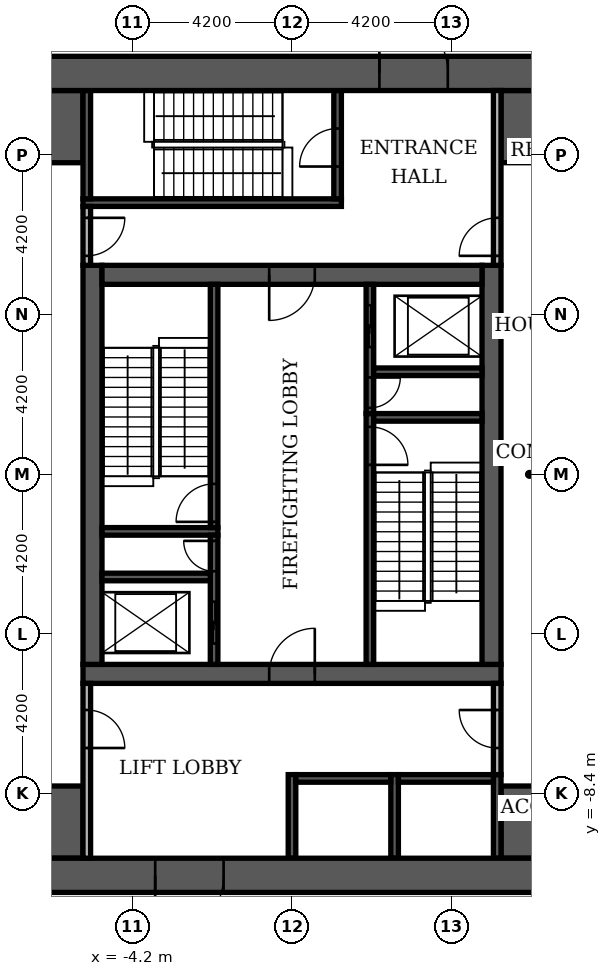
"""IFC4 building model, lengths in metres.
Left out: names, types, materials, properties, quantities, classifications, styles, units other than length and angle.
Written with IfcOpenShell. Run it as: python <this file> out.ifc"""

import sys

from ifc_helpers import new_model, si_unit, direction, frame, frame_2d, origin, place, context, subcontext, project, spatial, rectangle, extrude, element, fill, save


model = new_model("IFC4")
c1 = context("Model", 3, precision=1e-05, world=origin(), true_north=direction((0.0, 1.0)))
c2 = subcontext(c1, "Body", "Model", "MODEL_VIEW")
j1 = project(units=[si_unit("LENGTHUNIT", "METRE"), si_unit("PLANEANGLEUNIT", "RADIAN")], contexts=[c1])
p1 = place(None, origin())
s1 = spatial("IfcSite", under=j1, at=p1, CompositionType="ELEMENT")
p2 = place(p1, origin())
s2 = spatial("IfcBuilding", under=s1, at=p2, CompositionType="ELEMENT")
p3 = place(p2, frame((0.0, 0.0, 12.0)))
s3 = spatial("IfcBuildingStorey", under=s2, at=p3, CompositionType="ELEMENT", Elevation=12.0)
p4 = place(p3, frame((-5.5, -5.25, 0.0), z_axis=(0.0, 0.0, 1.0), x_axis=(1.0, 0.0, 0.0)))
e1 = element("IfcWall", 1, at=p4, inside=s3, PredefinedType="SHEAR", context=c2, shape_type="SweptSolid", body=[
    extrude(rectangle(XDim=11.0, YDim=0.5, at=frame_2d((5.5, 0.0))), origin(), (0.0, 0.0, 1.0), 4.38),
])
p5 = place(p4, frame((4.9, 0.0, 0.0)))
e2 = element("IfcOpeningElement", 2, at=p5, cuts=e1, PredefinedType="OPENING", context=c2, shape_type="SweptSolid", body=[
    extrude(rectangle(XDim=1.2, YDim=2.1, at=frame_2d((0.6, 1.05))), frame((0.0, 0.26, 0.0), z_axis=(0.0, -1.0, 0.0), x_axis=(1.0, 0.0, 0.0)), (0.0, 0.0, 1.0), 0.52),
])
for number, where, z_axis, x_axis in (
    (3, (-5.25, -5.0, 0.0), (0.0, 0.0, 1.0), (0.0, 1.0, 0.0)),
    (4, (5.25, -5.0, 0.0), (0.0, 0.0, 1.0), (0.0, 1.0, 0.0)),
):
    element("IfcWall", number, at=place(p3, frame(where, z_axis=z_axis, x_axis=x_axis)), inside=s3, PredefinedType="SHEAR", context=c2, shape_type="SweptSolid", body=[
        extrude(rectangle(XDim=10.5, YDim=0.5, at=frame_2d((5.25, 0.0))), origin(), (0.0, 0.0, 1.0), 4.38),
    ])
p6 = place(p3, frame((-5.0, 5.25, 0.0), z_axis=(0.0, 0.0, 1.0), x_axis=(1.0, 0.0, 0.0)))
e5 = element("IfcWall", 5, at=p6, inside=s3, PredefinedType="SHEAR", context=c2, shape_type="SweptSolid", body=[
    extrude(rectangle(XDim=10.0, YDim=0.5, at=frame_2d((5.0, 0.0))), origin(), (0.0, 0.0, 1.0), 4.38),
])
p7 = place(p6, frame((4.4, 0.0, 0.0)))
e6 = element("IfcOpeningElement", 6, at=p7, cuts=e5, PredefinedType="OPENING", context=c2, shape_type="SweptSolid", body=[
    extrude(rectangle(XDim=1.2, YDim=2.1, at=frame_2d((0.6, 1.05))), frame((0.0, 0.26, 0.0), z_axis=(0.0, -1.0, 0.0), x_axis=(1.0, 0.0, 0.0)), (0.0, 0.0, 1.0), 0.52),
])
for number, where, z_axis, x_axis in (
    (7, (-10.1, -9.15, 0.0), (0.0, 0.0, 1.0), (1.0, 0.0, 0.0)),
    (8, (5.5, -9.15, 0.0), (0.0, 0.0, 1.0), (1.0, 0.0, 0.0)),
    (9, (-10.1, 9.15, 0.0), (0.0, 0.0, 1.0), (1.0, 0.0, 0.0)),
    (10, (5.5, 9.15, 0.0), (0.0, 0.0, 1.0), (1.0, 0.0, 0.0)),
):
    element("IfcWall", number, at=place(p3, frame(where, z_axis=z_axis, x_axis=x_axis)), inside=s3, PredefinedType="SHEAR", context=c2, shape_type="SweptSolid", body=[
        extrude(rectangle(XDim=4.6, YDim=1.9, at=frame_2d((2.3, 0.0))), origin(), (0.0, 0.0, 1.0), 4.38),
    ])
p8 = place(p3, frame((2.05, -5.0, 0.0), z_axis=(0.0, 0.0, 1.0), x_axis=(0.0, 1.0, 0.0)))
e11 = element("IfcWall", 11, at=p8, inside=s3, PredefinedType="SHEAR", context=c2, shape_type="SweptSolid", body=[
    extrude(rectangle(XDim=6.6, YDim=0.2, at=frame_2d((3.3, 0.0))), origin(), (0.0, 0.0, 1.0), 4.38),
])
p9 = place(p8, frame((5.25, 0.0, 0.0)))
e12 = element("IfcOpeningElement", 12, at=p9, cuts=e11, PredefinedType="OPENING", context=c2, shape_type="SweptSolid", body=[
    extrude(rectangle(XDim=1.0, YDim=2.1, at=frame_2d((0.5, 1.05))), frame((0.0, 0.11, 0.0), z_axis=(0.0, -1.0, 0.0), x_axis=(1.0, 0.0, 0.0)), (0.0, 0.0, 1.0), 0.22),
])
p10 = place(p3, frame((-5.0, -1.5, 0.0), z_axis=(0.0, 0.0, 1.0), x_axis=(1.0, 0.0, 0.0)))
e13 = element("IfcWall", 13, at=p10, inside=s3, PredefinedType="SHEAR", context=c2, shape_type="SweptSolid", body=[
    extrude(rectangle(XDim=3.05, YDim=0.2, at=frame_2d((1.525, 0.0))), origin(), (0.0, 0.0, 1.0), 4.38),
])
p11 = place(p3, frame((-2.05, -1.4, 0.0), z_axis=(0.0, 0.0, 1.0), x_axis=(0.0, 1.0, 0.0)))
e14 = element("IfcWall", 14, at=p11, inside=s3, PredefinedType="SHEAR", context=c2, shape_type="SweptSolid", body=[
    extrude(rectangle(XDim=6.4, YDim=0.2, at=frame_2d((3.2, 0.0))), origin(), (0.0, 0.0, 1.0), 4.38),
])
p12 = place(p11, frame((0.15, 0.0, 0.0)))
e15 = element("IfcOpeningElement", 15, at=p12, cuts=e14, PredefinedType="OPENING", context=c2, shape_type="SweptSolid", body=[
    extrude(rectangle(XDim=1.0, YDim=2.1, at=frame_2d((0.5, 1.05))), frame((0.0, 0.11, 0.0), z_axis=(0.0, -1.0, 0.0), x_axis=(1.0, 0.0, 0.0)), (0.0, 0.0, 1.0), 0.22),
])
p13 = place(p3, frame((2.15, 1.5, 0.0), z_axis=(0.0, 0.0, 1.0), x_axis=(1.0, 0.0, 0.0)))
e16 = element("IfcWall", 16, at=p13, inside=s3, PredefinedType="SHEAR", context=c2, shape_type="SweptSolid", body=[
    extrude(rectangle(XDim=2.85, YDim=0.2, at=frame_2d((1.425, 0.0))), origin(), (0.0, 0.0, 1.0), 4.38),
])
p14 = place(p3, frame((-5.5, 7.15, 0.0), z_axis=(0.0, 0.0, 1.0), x_axis=(1.0, 0.0, 0.0)))
e17 = element("IfcWall", 17, at=p14, inside=s3, PredefinedType="SHEAR", context=c2, shape_type="SweptSolid", body=[
    extrude(rectangle(XDim=6.8, YDim=0.2, at=frame_2d((3.4, 0.0))), origin(), (0.0, 0.0, 1.0), 4.38),
])
p15 = place(p3, frame((-5.4, 7.25, 0.0), z_axis=(0.0, 0.0, 1.0), x_axis=(0.0, 1.0, 0.0)))
e18 = element("IfcWall", 18, at=p15, inside=s3, PredefinedType="SHEAR", context=c2, shape_type="SweptSolid", body=[
    extrude(rectangle(XDim=2.85, YDim=0.2, at=frame_2d((1.425, 0.0))), origin(), (0.0, 0.0, 1.0), 4.38),
])
p16 = place(p3, frame((1.2, 7.25, 0.0), z_axis=(0.0, 0.0, 1.0), x_axis=(0.0, 1.0, 0.0)))
e19 = element("IfcWall", 19, at=p16, inside=s3, PredefinedType="SHEAR", context=c2, shape_type="SweptSolid", body=[
    extrude(rectangle(XDim=2.85, YDim=0.2, at=frame_2d((1.425, 0.0))), origin(), (0.0, 0.0, 1.0), 4.38),
])
p17 = place(p16, frame((0.85, 0.0, 0.0)))
e20 = element("IfcOpeningElement", 20, at=p17, cuts=e19, PredefinedType="OPENING", context=c2, shape_type="SweptSolid", body=[
    extrude(rectangle(XDim=1.0, YDim=2.1, at=frame_2d((0.5, 1.05))), frame((0.0, 0.11, 0.0), z_axis=(0.0, -1.0, 0.0), x_axis=(1.0, 0.0, 0.0)), (0.0, 0.0, 1.0), 0.22),
])
for number, where, z_axis, x_axis in (
    (21, (0.0, -10.1, 0.0), (0.0, 0.0, 1.0), (0.0, 1.0, 0.0)),
    (22, (2.7, -10.1, 0.0), (0.0, 0.0, 1.0), (0.0, 1.0, 0.0)),
    (23, (5.4, -10.1, 0.0), (0.0, 0.0, 1.0), (0.0, 1.0, 0.0)),
):
    element("IfcWall", number, at=place(p3, frame(where, z_axis=z_axis, x_axis=x_axis)), inside=s3, PredefinedType="SHEAR", context=c2, shape_type="SweptSolid", body=[
        extrude(rectangle(XDim=2.2, YDim=0.2, at=frame_2d((1.1, 0.0))), origin(), (0.0, 0.0, 1.0), 4.38),
    ])
for number, where, z_axis, x_axis in (
    (24, (0.1, -8.0, 0.0), (0.0, 0.0, 1.0), (1.0, 0.0, 0.0)),
    (25, (2.8, -8.0, 0.0), (0.0, 0.0, 1.0), (1.0, 0.0, 0.0)),
):
    element("IfcWall", number, at=place(p3, frame(where, z_axis=z_axis, x_axis=x_axis)), inside=s3, PredefinedType="SHEAR", context=c2, shape_type="SweptSolid", body=[
        extrude(rectangle(XDim=2.5, YDim=0.2, at=frame_2d((1.25, 0.0))), origin(), (0.0, 0.0, 1.0), 4.38),
    ])
p18 = place(p3, frame((-2.05, -5.0, 0.0), z_axis=(0.0, 0.0, 1.0), x_axis=(0.0, 1.0, 0.0)))
e26 = element("IfcWall", 26, at=p18, inside=s3, PredefinedType="SHEAR", context=c2, shape_type="SweptSolid", body=[
    extrude(rectangle(XDim=3.4, YDim=0.2, at=frame_2d((1.7, 0.0))), origin(), (0.0, 0.0, 1.0), 4.38),
])
p19 = place(p18, frame((0.55, 0.0, 0.0)))
e27 = element("IfcOpeningElement", 27, at=p19, cuts=e26, PredefinedType="OPENING", context=c2, shape_type="SweptSolid", body=[
    extrude(rectangle(XDim=1.1, YDim=2.1, at=frame_2d((0.55, 1.05))), frame((0.0, 0.11, 0.0), z_axis=(0.0, -1.0, 0.0), x_axis=(1.0, 0.0, 0.0)), (0.0, 0.0, 1.0), 0.22),
])
p20 = place(p18, frame((2.45, 0.0, 0.0)))
e28 = element("IfcOpeningElement", 28, at=p20, cuts=e26, PredefinedType="OPENING", context=c2, shape_type="SweptSolid", body=[
    extrude(rectangle(XDim=0.8, YDim=2.1, at=frame_2d((0.4, 1.05))), frame((0.0, 0.11, 0.0), z_axis=(0.0, -1.0, 0.0), x_axis=(1.0, 0.0, 0.0)), (0.0, 0.0, 1.0), 0.22),
])
p21 = place(p3, frame((-5.0, -2.7, 0.0), z_axis=(0.0, 0.0, 1.0), x_axis=(1.0, 0.0, 0.0)))
e29 = element("IfcWall", 29, at=p21, inside=s3, PredefinedType="SHEAR", context=c2, shape_type="SweptSolid", body=[
    extrude(rectangle(XDim=2.85, YDim=0.2, at=frame_2d((1.425, 0.0))), origin(), (0.0, 0.0, 1.0), 4.38),
])
p22 = place(p3, frame((2.05, 1.6, 0.0), z_axis=(0.0, 0.0, 1.0), x_axis=(0.0, 1.0, 0.0)))
e30 = element("IfcWall", 30, at=p22, inside=s3, PredefinedType="SHEAR", context=c2, shape_type="SweptSolid", body=[
    extrude(rectangle(XDim=3.4, YDim=0.2, at=frame_2d((1.7, 0.0))), origin(), (0.0, 0.0, 1.0), 4.38),
])
p23 = place(p22, frame((1.75, 0.0, 0.0)))
e31 = element("IfcOpeningElement", 31, at=p23, cuts=e30, PredefinedType="OPENING", context=c2, shape_type="SweptSolid", body=[
    extrude(rectangle(XDim=1.1, YDim=2.1, at=frame_2d((0.55, 1.05))), frame((0.0, 0.11, 0.0), z_axis=(0.0, -1.0, 0.0), x_axis=(1.0, 0.0, 0.0)), (0.0, 0.0, 1.0), 0.22),
])
p24 = place(p22, frame((0.15, 0.0, 0.0)))
e32 = element("IfcOpeningElement", 32, at=p24, cuts=e30, PredefinedType="OPENING", context=c2, shape_type="SweptSolid", body=[
    extrude(rectangle(XDim=0.8, YDim=2.1, at=frame_2d((0.4, 1.05))), frame((0.0, 0.11, 0.0), z_axis=(0.0, -1.0, 0.0), x_axis=(1.0, 0.0, 0.0)), (0.0, 0.0, 1.0), 0.22),
])
p25 = place(p3, frame((2.15, 2.7, 0.0), z_axis=(0.0, 0.0, 1.0), x_axis=(1.0, 0.0, 0.0)))
e33 = element("IfcWall", 33, at=p25, inside=s3, PredefinedType="SHEAR", context=c2, shape_type="SweptSolid", body=[
    extrude(rectangle(XDim=2.85, YDim=0.2, at=frame_2d((1.425, 0.0))), origin(), (0.0, 0.0, 1.0), 4.38),
])
p26 = place(p3, frame((-11.0, -10.55, 0.0), z_axis=(0.0, 0.0, 1.0), x_axis=(1.0, 0.0, 0.0)))
e34 = element("IfcWall", 34, at=p26, inside=s3, PredefinedType="SHEAR", context=c2, shape_type="SweptSolid", body=[
    extrude(rectangle(XDim=22.0, YDim=0.9, at=frame_2d((11.0, 0.0))), origin(), (0.0, 0.0, 1.0), 4.38),
])
p27 = place(p26, frame((7.4, 0.0, 0.0)))
e35 = element("IfcOpeningElement", 35, at=p27, cuts=e34, PredefinedType="OPENING", context=c2, shape_type="SweptSolid", body=[
    extrude(rectangle(XDim=1.8, YDim=2.2, at=frame_2d((0.9, 1.1))), frame((0.0, 0.46, 0.0), z_axis=(0.0, -1.0, 0.0), x_axis=(1.0, 0.0, 0.0)), (0.0, 0.0, 1.0), 0.92),
])
p28 = place(p3, frame((-11.0, 10.55, 0.0), z_axis=(0.0, 0.0, 1.0), x_axis=(1.0, 0.0, 0.0)))
e36 = element("IfcWall", 36, at=p28, inside=s3, PredefinedType="SHEAR", context=c2, shape_type="SweptSolid", body=[
    extrude(rectangle(XDim=22.0, YDim=0.9, at=frame_2d((11.0, 0.0))), origin(), (0.0, 0.0, 1.0), 4.38),
])
p29 = place(p28, frame((13.3, 0.0, 0.0)))
e37 = element("IfcOpeningElement", 37, at=p29, cuts=e36, PredefinedType="OPENING", context=c2, shape_type="SweptSolid", body=[
    extrude(rectangle(XDim=1.8, YDim=2.2, at=frame_2d((0.9, 1.1))), frame((0.0, 0.46, 0.0), z_axis=(0.0, -1.0, 0.0), x_axis=(1.0, 0.0, 0.0)), (0.0, 0.0, 1.0), 0.92),
])
p30 = place(p3, frame((-5.4, -10.1, 0.0), z_axis=(0.0, 0.0, 1.0), x_axis=(0.0, 1.0, 0.0)))
e38 = element("IfcWall", 38, at=p30, inside=s3, PredefinedType="PARTITIONING", context=c2, shape_type="SweptSolid", body=[
    extrude(rectangle(XDim=4.6, YDim=0.2, at=frame_2d((2.3, 0.0))), origin(), (0.0, 0.0, 1.0), 4.38),
])
p31 = place(p30, frame((2.9, 0.0, 0.0)))
e39 = element("IfcOpeningElement", 39, at=p31, cuts=e38, PredefinedType="OPENING", context=c2, shape_type="SweptSolid", body=[
    extrude(rectangle(XDim=1.0, YDim=2.1, at=frame_2d((0.5, 1.05))), frame((0.0, 0.11, 0.0), z_axis=(0.0, -1.0, 0.0), x_axis=(1.0, 0.0, 0.0)), (0.0, 0.0, 1.0), 0.22),
])
p32 = place(p3, frame((5.4, -7.9, 0.0), z_axis=(0.0, 0.0, 1.0), x_axis=(0.0, 1.0, 0.0)))
e40 = element("IfcWall", 40, at=p32, inside=s3, PredefinedType="PARTITIONING", context=c2, shape_type="SweptSolid", body=[
    extrude(rectangle(XDim=2.4, YDim=0.2, at=frame_2d((1.2, 0.0))), origin(), (0.0, 0.0, 1.0), 4.38),
])
p33 = place(p32, frame((0.7, 0.0, 0.0)))
e41 = element("IfcOpeningElement", 41, at=p33, cuts=e40, PredefinedType="OPENING", context=c2, shape_type="SweptSolid", body=[
    extrude(rectangle(XDim=1.0, YDim=2.1, at=frame_2d((0.5, 1.05))), frame((0.0, 0.11, 0.0), z_axis=(0.0, -1.0, 0.0), x_axis=(1.0, 0.0, 0.0)), (0.0, 0.0, 1.0), 0.22),
])
p34 = place(p3, frame((-5.4, 5.5, 0.0), z_axis=(0.0, 0.0, 1.0), x_axis=(0.0, 1.0, 0.0)))
e42 = element("IfcWall", 42, at=p34, inside=s3, PredefinedType="PARTITIONING", context=c2, shape_type="SweptSolid", body=[
    extrude(rectangle(XDim=1.55, YDim=0.2, at=frame_2d((0.775, 0.0))), origin(), (0.0, 0.0, 1.0), 4.38),
])
p35 = place(p34, frame((0.25, 0.0, 0.0)))
e43 = element("IfcOpeningElement", 43, at=p35, cuts=e42, PredefinedType="OPENING", context=c2, shape_type="SweptSolid", body=[
    extrude(rectangle(XDim=1.0, YDim=2.1, at=frame_2d((0.5, 1.05))), frame((0.0, 0.11, 0.0), z_axis=(0.0, -1.0, 0.0), x_axis=(1.0, 0.0, 0.0)), (0.0, 0.0, 1.0), 0.22),
])
p36 = place(p3, frame((5.4, 5.5, 0.0), z_axis=(0.0, 0.0, 1.0), x_axis=(0.0, 1.0, 0.0)))
e44 = element("IfcWall", 44, at=p36, inside=s3, PredefinedType="PARTITIONING", context=c2, shape_type="SweptSolid", body=[
    extrude(rectangle(XDim=4.6, YDim=0.2, at=frame_2d((2.3, 0.0))), origin(), (0.0, 0.0, 1.0), 4.38),
])
p37 = place(p36, frame((0.25, 0.0, 0.0)))
e45 = element("IfcOpeningElement", 45, at=p37, cuts=e44, PredefinedType="OPENING", context=c2, shape_type="SweptSolid", body=[
    extrude(rectangle(XDim=1.0, YDim=2.1, at=frame_2d((0.5, 1.05))), frame((0.0, 0.11, 0.0), z_axis=(0.0, -1.0, 0.0), x_axis=(1.0, 0.0, 0.0)), (0.0, 0.0, 1.0), 0.22),
])
p38 = place(p23, origin())
e46 = element("IfcDoor", 46, at=p38, inside=s3, OperationType="SLIDING_TO_LEFT", PredefinedType="DOOR", context=c2, shape_type="SweptSolid", body=[
    extrude(rectangle(XDim=1.1, YDim=2.1, at=frame_2d((0.55, 1.05))), frame((0.0, 0.025, 0.0), z_axis=(0.0, -1.0, 0.0), x_axis=(1.0, 0.0, 0.0)), (0.0, 0.0, 1.0), 0.05),
])
fill(e31, e46)
p39 = place(p19, origin())
e47 = element("IfcDoor", 47, at=p39, inside=s3, OperationType="SLIDING_TO_LEFT", PredefinedType="DOOR", context=c2, shape_type="SweptSolid", body=[
    extrude(rectangle(XDim=1.1, YDim=2.1, at=frame_2d((0.55, 1.05))), frame((0.0, 0.025, 0.0), z_axis=(0.0, -1.0, 0.0), x_axis=(1.0, 0.0, 0.0)), (0.0, 0.0, 1.0), 0.05),
])
fill(e27, e47)
p40 = place(p12, origin())
e48 = element("IfcDoor", 48, at=p40, inside=s3, OperationType="SINGLE_SWING_LEFT", PredefinedType="DOOR", context=c2, shape_type="SweptSolid", body=[
    extrude(rectangle(XDim=1.0, YDim=2.1, at=frame_2d((0.5, 1.05))), frame((0.0, 0.025, 0.0), z_axis=(0.0, -1.0, 0.0), x_axis=(1.0, 0.0, 0.0)), (0.0, 0.0, 1.0), 0.05),
])
fill(e15, e48)
p41 = place(p9, frame((1.0, 0.0, 0.0), z_axis=(0.0, 0.0, 1.0), x_axis=(-1.0, 0.0, 0.0)))
e49 = element("IfcDoor", 49, at=p41, inside=s3, OperationType="SINGLE_SWING_LEFT", PredefinedType="DOOR", context=c2, shape_type="SweptSolid", body=[
    extrude(rectangle(XDim=1.0, YDim=2.1, at=frame_2d((0.5, 1.05))), frame((0.0, 0.025, 0.0), z_axis=(0.0, -1.0, 0.0), x_axis=(1.0, 0.0, 0.0)), (0.0, 0.0, 1.0), 0.05),
])
fill(e12, e49)
p42 = place(p24, frame((0.8, 0.0, 0.0), z_axis=(0.0, 0.0, 1.0), x_axis=(-1.0, 0.0, 0.0)))
e50 = element("IfcDoor", 50, at=p42, inside=s3, OperationType="SINGLE_SWING_RIGHT", PredefinedType="DOOR", context=c2, shape_type="SweptSolid", body=[
    extrude(rectangle(XDim=0.8, YDim=2.1, at=frame_2d((0.4, 1.05))), frame((0.0, 0.025, 0.0), z_axis=(0.0, -1.0, 0.0), x_axis=(1.0, 0.0, 0.0)), (0.0, 0.0, 1.0), 0.05),
])
fill(e32, e50)
p43 = place(p20, origin())
e51 = element("IfcDoor", 51, at=p43, inside=s3, OperationType="SINGLE_SWING_RIGHT", PredefinedType="DOOR", context=c2, shape_type="SweptSolid", body=[
    extrude(rectangle(XDim=0.8, YDim=2.1, at=frame_2d((0.4, 1.05))), frame((0.0, 0.025, 0.0), z_axis=(0.0, -1.0, 0.0), x_axis=(1.0, 0.0, 0.0)), (0.0, 0.0, 1.0), 0.05),
])
fill(e28, e51)
p44 = place(p7, frame((1.2, 0.0, 0.0), z_axis=(0.0, 0.0, 1.0), x_axis=(-1.0, 0.0, 0.0)))
e52 = element("IfcDoor", 52, at=p44, inside=s3, OperationType="SINGLE_SWING_LEFT", PredefinedType="DOOR", context=c2, shape_type="SweptSolid", body=[
    extrude(rectangle(XDim=1.2, YDim=2.1, at=frame_2d((0.6, 1.05))), frame((0.0, 0.025, 0.0), z_axis=(0.0, -1.0, 0.0), x_axis=(1.0, 0.0, 0.0)), (0.0, 0.0, 1.0), 0.05),
])
fill(e6, e52)
p45 = place(p5, origin())
e53 = element("IfcDoor", 53, at=p45, inside=s3, OperationType="SINGLE_SWING_RIGHT", PredefinedType="DOOR", context=c2, shape_type="SweptSolid", body=[
    extrude(rectangle(XDim=1.2, YDim=2.1, at=frame_2d((0.6, 1.05))), frame((0.0, 0.025, 0.0), z_axis=(0.0, -1.0, 0.0), x_axis=(1.0, 0.0, 0.0)), (0.0, 0.0, 1.0), 0.05),
])
fill(e2, e53)
p46 = place(p17, origin())
e54 = element("IfcDoor", 54, at=p46, inside=s3, OperationType="SINGLE_SWING_LEFT", PredefinedType="DOOR", context=c2, shape_type="SweptSolid", body=[
    extrude(rectangle(XDim=1.0, YDim=2.1, at=frame_2d((0.5, 1.05))), frame((0.0, 0.025, 0.0), z_axis=(0.0, -1.0, 0.0), x_axis=(1.0, 0.0, 0.0)), (0.0, 0.0, 1.0), 0.05),
])
fill(e20, e54)
p47 = place(p35, frame((1.0, 0.0, 0.0), z_axis=(0.0, 0.0, 1.0), x_axis=(-1.0, 0.0, 0.0)))
e55 = element("IfcDoor", 55, at=p47, inside=s3, OperationType="SINGLE_SWING_RIGHT", PredefinedType="DOOR", context=c2, shape_type="SweptSolid", body=[
    extrude(rectangle(XDim=1.0, YDim=2.1, at=frame_2d((0.5, 1.05))), frame((0.0, 0.025, 0.0), z_axis=(0.0, -1.0, 0.0), x_axis=(1.0, 0.0, 0.0)), (0.0, 0.0, 1.0), 0.05),
])
fill(e43, e55)
p48 = place(p37, origin())
e56 = element("IfcDoor", 56, at=p48, inside=s3, OperationType="SINGLE_SWING_LEFT", PredefinedType="DOOR", context=c2, shape_type="SweptSolid", body=[
    extrude(rectangle(XDim=1.0, YDim=2.1, at=frame_2d((0.5, 1.05))), frame((0.0, 0.025, 0.0), z_axis=(0.0, -1.0, 0.0), x_axis=(1.0, 0.0, 0.0)), (0.0, 0.0, 1.0), 0.05),
])
fill(e45, e56)
p49 = place(p31, frame((1.0, 0.0, 0.0), z_axis=(0.0, 0.0, 1.0), x_axis=(-1.0, 0.0, 0.0)))
e57 = element("IfcDoor", 57, at=p49, inside=s3, OperationType="SINGLE_SWING_LEFT", PredefinedType="DOOR", context=c2, shape_type="SweptSolid", body=[
    extrude(rectangle(XDim=1.0, YDim=2.1, at=frame_2d((0.5, 1.05))), frame((0.0, 0.025, 0.0), z_axis=(0.0, -1.0, 0.0), x_axis=(1.0, 0.0, 0.0)), (0.0, 0.0, 1.0), 0.05),
])
fill(e39, e57)
p50 = place(p33, origin())
e58 = element("IfcDoor", 58, at=p50, inside=s3, OperationType="SINGLE_SWING_RIGHT", PredefinedType="DOOR", context=c2, shape_type="SweptSolid", body=[
    extrude(rectangle(XDim=1.0, YDim=2.1, at=frame_2d((0.5, 1.05))), frame((0.0, 0.025, 0.0), z_axis=(0.0, -1.0, 0.0), x_axis=(1.0, 0.0, 0.0)), (0.0, 0.0, 1.0), 0.05),
])
fill(e41, e58)
p51 = place(p29, origin())
e59 = element("IfcDoor", 59, at=p51, inside=s3, OperationType="DOUBLE_DOOR_SINGLE_SWING", PredefinedType="DOOR", context=c2, shape_type="SweptSolid", body=[
    extrude(rectangle(XDim=1.8, YDim=2.2, at=frame_2d((0.9, 1.1))), frame((0.0, 0.025, 0.0), z_axis=(0.0, -1.0, 0.0), x_axis=(1.0, 0.0, 0.0)), (0.0, 0.0, 1.0), 0.05),
])
fill(e37, e59)
p52 = place(p27, frame((1.8, 0.0, 0.0), z_axis=(0.0, 0.0, 1.0), x_axis=(-1.0, 0.0, 0.0)))
e60 = element("IfcDoor", 60, at=p52, inside=s3, OperationType="DOUBLE_DOOR_SINGLE_SWING", PredefinedType="DOOR", context=c2, shape_type="SweptSolid", body=[
    extrude(rectangle(XDim=1.8, YDim=2.2, at=frame_2d((0.9, 1.1))), frame((0.0, 0.025, 0.0), z_axis=(0.0, -1.0, 0.0), x_axis=(1.0, 0.0, 0.0)), (0.0, 0.0, 1.0), 0.05),
])
fill(e35, e60)
save(model, sys.argv[1])
